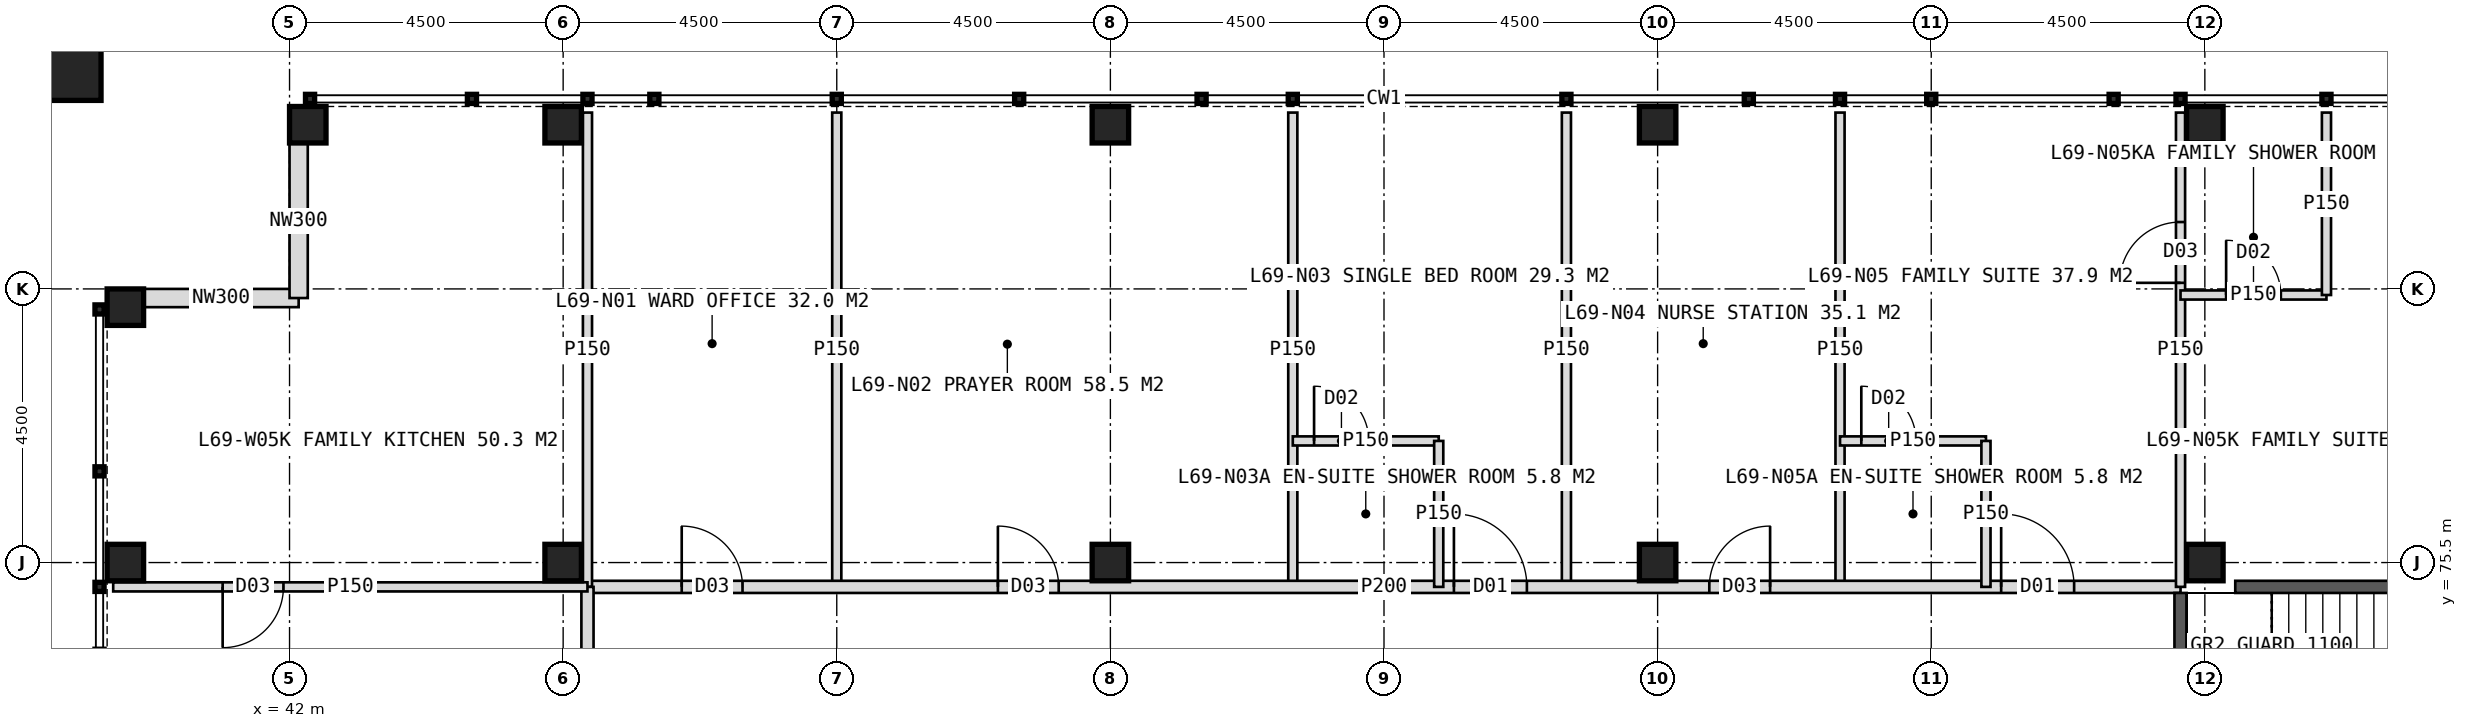
"""IFC4 building model, lengths in metres.
Left out: names, types, materials, properties, quantities, classifications, styles, units other than length and angle.
Written with IfcOpenShell. Run it as: python <this file> out.ifc"""

import sys

from ifc_helpers import new_model, si_unit, direction, frame, frame_2d, origin, origin_2d, place, context, subcontext, project, spatial, rectangle, hollow_rectangle, extrude, element, fill, save


model = new_model("IFC4")
c1 = context("Model", 3, precision=1e-05, world=origin(), true_north=direction((0.0, 1.0)))
c2 = subcontext(c1, "Body", "Model", "MODEL_VIEW")
j1 = project(units=[si_unit("LENGTHUNIT", "METRE"), si_unit("PLANEANGLEUNIT", "RADIAN")], contexts=[c1])
p1 = place(None, origin())
s1 = spatial("IfcSite", under=j1, at=p1, CompositionType="ELEMENT")
p2 = place(p1, origin())
s2 = spatial("IfcBuilding", under=s1, at=p2, CompositionType="ELEMENT")
p3 = place(p2, frame((0.0, 0.0, 286.0)))
s3 = spatial("IfcBuildingStorey", under=s2, at=p3, CompositionType="ELEMENT", Elevation=286.0)
for number, where, z_axis, x_axis in (
    (1, (73.5, 75.5, 0.0), (0.0, 0.0, 1.0), (1.0, 0.0, 0.0)),
    (2, (46.5, 75.5, 0.0), (0.0, 0.0, 1.0), (1.0, 0.0, 0.0)),
    (3, (55.5, 75.5, 0.0), (0.0, 0.0, 1.0), (1.0, 0.0, 0.0)),
    (4, (64.5, 75.5, 0.0), (0.0, 0.0, 1.0), (1.0, 0.0, 0.0)),
    (5, (42.3, 82.7, 0.0), (0.0, 0.0, 1.0), (1.0, 0.0, 0.0)),
    (6, (46.5, 82.7, 0.0), (0.0, 0.0, 1.0), (1.0, 0.0, 0.0)),
    (7, (55.5, 82.7, 0.0), (0.0, 0.0, 1.0), (1.0, 0.0, 0.0)),
    (8, (64.5, 82.7, 0.0), (0.0, 0.0, 1.0), (1.0, 0.0, 0.0)),
    (9, (73.5, 82.7, 0.0), (0.0, 0.0, 1.0), (1.0, 0.0, 0.0)),
    (10, (39.3, 75.5, 0.0), (0.0, 0.0, 1.0), (1.0, 0.0, 0.0)),
    (11, (39.3, 79.7, 0.0), (0.0, 0.0, 1.0), (1.0, 0.0, 0.0)),
):
    element("IfcColumn", number, at=place(p3, frame(where, z_axis=z_axis, x_axis=x_axis)), inside=s3, PredefinedType="COLUMN", context=c2, shape_type="SweptSolid", body=[
        extrude(hollow_rectangle(XDim=0.6, YDim=0.6, WallThickness=0.04, at=origin_2d()), origin(), (0.0, 0.0, 1.0), 4.0),
    ])
p4 = place(p3, frame((38.4, 83.6, 0.0), z_axis=(0.0, 0.0, 1.0), x_axis=(1.0, 0.0, 0.0)))
e12 = element("IfcColumn", 12, at=p4, inside=s3, PredefinedType="COLUMN", context=c2, shape_type="SweptSolid", body=[
    extrude(hollow_rectangle(XDim=1.0, YDim=1.0, WallThickness=0.06, at=origin_2d()), origin(), (0.0, 0.0, 1.0), 4.0),
])
for number, where, z_axis, x_axis in (
    (13, (39.6, 79.85, 0.0), (0.0, 0.0, 1.0), (1.0, 0.0, 0.0)),
    (14, (42.15, 79.85, 0.0), (0.0, 0.0, 1.0), (0.0, 1.0, 0.0)),
):
    element("IfcWall", number, at=place(p3, frame(where, z_axis=z_axis, x_axis=x_axis)), inside=s3, PredefinedType="ELEMENTEDWALL", context=c2, shape_type="SweptSolid", body=[
        extrude(rectangle(XDim=2.55, YDim=0.3, at=frame_2d((1.275, 0.0))), origin(), (0.0, 0.0, 1.0), 2.95),
    ])
for number, where, z_axis, x_axis in (
    (15, (51.0, 75.1, 0.0), (0.0, 0.0, 1.0), (0.0, 1.0, 0.0)),
    (16, (58.5, 75.1, 0.0), (0.0, 0.0, 1.0), (0.0, 1.0, 0.0)),
    (17, (63.0, 75.1, 0.0), (0.0, 0.0, 1.0), (0.0, 1.0, 0.0)),
    (18, (67.5, 75.1, 0.0), (0.0, 0.0, 1.0), (0.0, 1.0, 0.0)),
):
    element("IfcWall", number, at=place(p3, frame(where, z_axis=z_axis, x_axis=x_axis)), inside=s3, PredefinedType="PARTITIONING", context=c2, shape_type="SweptSolid", body=[
        extrude(rectangle(XDim=7.8, YDim=0.15, at=frame_2d((3.9, 0.0))), origin(), (0.0, 0.0, 1.0), 3.75),
    ])
p5 = place(p3, frame((46.9, 75.1, 0.0), z_axis=(0.0, 0.0, 1.0), x_axis=(1.0, 0.0, 0.0)))
e19 = element("IfcWall", 19, at=p5, inside=s3, PredefinedType="PARTITIONING", context=c2, shape_type="SweptSolid", body=[
    extrude(rectangle(XDim=26.2, YDim=0.2, at=frame_2d((13.1, 0.0))), origin(), (0.0, 0.0, 1.0), 3.75),
])
p6 = place(p5, frame((1.55, 0.0, 0.0)))
e20 = element("IfcOpeningElement", 20, at=p6, cuts=e19, PredefinedType="OPENING", context=c2, shape_type="SweptSolid", body=[
    extrude(rectangle(XDim=1.0, YDim=2.1, at=frame_2d((0.5, 1.05))), frame((0.0, 0.11, 0.0), z_axis=(0.0, -1.0, 0.0), x_axis=(1.0, 0.0, 0.0)), (0.0, 0.0, 1.0), 0.22),
])
p7 = place(p5, frame((6.75, 0.0, 0.0)))
e21 = element("IfcOpeningElement", 21, at=p7, cuts=e19, PredefinedType="OPENING", context=c2, shape_type="SweptSolid", body=[
    extrude(rectangle(XDim=1.0, YDim=2.1, at=frame_2d((0.5, 1.05))), frame((0.0, 0.11, 0.0), z_axis=(0.0, -1.0, 0.0), x_axis=(1.0, 0.0, 0.0)), (0.0, 0.0, 1.0), 0.22),
])
p8 = place(p5, frame((14.25, 0.0, 0.0)))
e22 = element("IfcOpeningElement", 22, at=p8, cuts=e19, PredefinedType="OPENING", context=c2, shape_type="SweptSolid", body=[
    extrude(rectangle(XDim=1.2, YDim=2.2, at=frame_2d((0.6, 1.1))), frame((0.0, 0.11, 0.0), z_axis=(0.0, -1.0, 0.0), x_axis=(1.0, 0.0, 0.0)), (0.0, 0.0, 1.0), 0.22),
])
p9 = place(p5, frame((18.45, 0.0, 0.0)))
e23 = element("IfcOpeningElement", 23, at=p9, cuts=e19, PredefinedType="OPENING", context=c2, shape_type="SweptSolid", body=[
    extrude(rectangle(XDim=1.0, YDim=2.1, at=frame_2d((0.5, 1.05))), frame((0.0, 0.11, 0.0), z_axis=(0.0, -1.0, 0.0), x_axis=(1.0, 0.0, 0.0)), (0.0, 0.0, 1.0), 0.22),
])
p10 = place(p5, frame((23.25, 0.0, 0.0)))
e24 = element("IfcOpeningElement", 24, at=p10, cuts=e19, PredefinedType="OPENING", context=c2, shape_type="SweptSolid", body=[
    extrude(rectangle(XDim=1.2, YDim=2.2, at=frame_2d((0.6, 1.1))), frame((0.0, 0.11, 0.0), z_axis=(0.0, -1.0, 0.0), x_axis=(1.0, 0.0, 0.0)), (0.0, 0.0, 1.0), 0.22),
])
p11 = place(p3, frame((46.9, 75.1, 0.0), z_axis=(0.0, 0.0, 1.0), x_axis=(0.0, 1.0, 0.0)))
e25 = element("IfcWall", 25, at=p11, inside=s3, PredefinedType="PARTITIONING", context=c2, shape_type="SweptSolid", body=[
    extrude(rectangle(XDim=7.8, YDim=0.15, at=frame_2d((3.9, 0.0))), origin(), (0.0, 0.0, 1.0), 3.75),
])
p12 = place(p3, frame((58.5, 77.5, 0.0), z_axis=(0.0, 0.0, 1.0), x_axis=(1.0, 0.0, 0.0)))
e26 = element("IfcWall", 26, at=p12, inside=s3, PredefinedType="PARTITIONING", context=c2, shape_type="SweptSolid", body=[
    extrude(rectangle(XDim=2.4, YDim=0.15, at=frame_2d((1.2, 0.0))), origin(), (0.0, 0.0, 1.0), 3.75),
])
p13 = place(p12, frame((0.35, 0.0, 0.0)))
e27 = element("IfcOpeningElement", 27, at=p13, cuts=e26, PredefinedType="OPENING", context=c2, shape_type="SweptSolid", body=[
    extrude(rectangle(XDim=0.9, YDim=2.1, at=frame_2d((0.45, 1.05))), frame((0.0, 0.085, 0.0), z_axis=(0.0, -1.0, 0.0), x_axis=(1.0, 0.0, 0.0)), (0.0, 0.0, 1.0), 0.17),
])
p14 = place(p3, frame((60.9, 75.1, 0.0), z_axis=(0.0, 0.0, 1.0), x_axis=(0.0, 1.0, 0.0)))
e28 = element("IfcWall", 28, at=p14, inside=s3, PredefinedType="PARTITIONING", context=c2, shape_type="SweptSolid", body=[
    extrude(rectangle(XDim=2.4, YDim=0.15, at=frame_2d((1.2, 0.0))), origin(), (0.0, 0.0, 1.0), 3.75),
])
p15 = place(p3, frame((73.1, 75.1, 0.0), z_axis=(0.0, 0.0, 1.0), x_axis=(0.0, 1.0, 0.0)))
e29 = element("IfcWall", 29, at=p15, inside=s3, PredefinedType="PARTITIONING", context=c2, shape_type="SweptSolid", body=[
    extrude(rectangle(XDim=7.8, YDim=0.15, at=frame_2d((3.9, 0.0))), origin(), (0.0, 0.0, 1.0), 3.75),
])
p16 = place(p15, frame((5.0, 0.0, 0.0)))
e30 = element("IfcOpeningElement", 30, at=p16, cuts=e29, PredefinedType="OPENING", context=c2, shape_type="SweptSolid", body=[
    extrude(rectangle(XDim=1.0, YDim=2.1, at=frame_2d((0.5, 1.05))), frame((0.0, 0.085, 0.0), z_axis=(0.0, -1.0, 0.0), x_axis=(1.0, 0.0, 0.0)), (0.0, 0.0, 1.0), 0.17),
])
p17 = place(p3, frame((73.1, 79.9, 0.0), z_axis=(0.0, 0.0, 1.0), x_axis=(1.0, 0.0, 0.0)))
e31 = element("IfcWall", 31, at=p17, inside=s3, PredefinedType="PARTITIONING", context=c2, shape_type="SweptSolid", body=[
    extrude(rectangle(XDim=2.4, YDim=0.15, at=frame_2d((1.2, 0.0))), origin(), (0.0, 0.0, 1.0), 3.75),
])
p18 = place(p17, frame((0.75, 0.0, 0.0)))
e32 = element("IfcOpeningElement", 32, at=p18, cuts=e31, PredefinedType="OPENING", context=c2, shape_type="SweptSolid", body=[
    extrude(rectangle(XDim=0.9, YDim=2.1, at=frame_2d((0.45, 1.05))), frame((0.0, 0.085, 0.0), z_axis=(0.0, -1.0, 0.0), x_axis=(1.0, 0.0, 0.0)), (0.0, 0.0, 1.0), 0.17),
])
p19 = place(p3, frame((75.5, 79.9, 0.0), z_axis=(0.0, 0.0, 1.0), x_axis=(0.0, 1.0, 0.0)))
e33 = element("IfcWall", 33, at=p19, inside=s3, PredefinedType="PARTITIONING", context=c2, shape_type="SweptSolid", body=[
    extrude(rectangle(XDim=3.0, YDim=0.15, at=frame_2d((1.5, 0.0))), origin(), (0.0, 0.0, 1.0), 3.75),
])
p20 = place(p3, frame((67.5, 77.5, 0.0), z_axis=(0.0, 0.0, 1.0), x_axis=(1.0, 0.0, 0.0)))
e34 = element("IfcWall", 34, at=p20, inside=s3, PredefinedType="PARTITIONING", context=c2, shape_type="SweptSolid", body=[
    extrude(rectangle(XDim=2.4, YDim=0.15, at=frame_2d((1.2, 0.0))), origin(), (0.0, 0.0, 1.0), 3.75),
])
p21 = place(p20, frame((0.35, 0.0, 0.0)))
e35 = element("IfcOpeningElement", 35, at=p21, cuts=e34, PredefinedType="OPENING", context=c2, shape_type="SweptSolid", body=[
    extrude(rectangle(XDim=0.9, YDim=2.1, at=frame_2d((0.45, 1.05))), frame((0.0, 0.085, 0.0), z_axis=(0.0, -1.0, 0.0), x_axis=(1.0, 0.0, 0.0)), (0.0, 0.0, 1.0), 0.17),
])
p22 = place(p3, frame((69.9, 75.1, 0.0), z_axis=(0.0, 0.0, 1.0), x_axis=(0.0, 1.0, 0.0)))
e36 = element("IfcWall", 36, at=p22, inside=s3, PredefinedType="PARTITIONING", context=c2, shape_type="SweptSolid", body=[
    extrude(rectangle(XDim=2.4, YDim=0.15, at=frame_2d((1.2, 0.0))), origin(), (0.0, 0.0, 1.0), 3.75),
])
p23 = place(p3, frame((46.9, 48.9, 0.0), z_axis=(0.0, 0.0, 1.0), x_axis=(0.0, 1.0, 0.0)))
e37 = element("IfcWall", 37, at=p23, inside=s3, PredefinedType="PARTITIONING", context=c2, shape_type="SweptSolid", body=[
    extrude(rectangle(XDim=26.2, YDim=0.2, at=frame_2d((13.1, 0.0))), origin(), (0.0, 0.0, 1.0), 3.75),
])
p24 = place(p23, frame((1.55, 0.0, 0.0)))
e38 = element("IfcOpeningElement", 38, at=p24, cuts=e37, PredefinedType="OPENING", context=c2, shape_type="SweptSolid", body=[
    extrude(rectangle(XDim=1.0, YDim=2.1, at=frame_2d((0.5, 1.05))), frame((0.0, 0.11, 0.0), z_axis=(0.0, -1.0, 0.0), x_axis=(1.0, 0.0, 0.0)), (0.0, 0.0, 1.0), 0.22),
])
p25 = place(p23, frame((6.6, 0.0, 0.0)))
e39 = element("IfcOpeningElement", 39, at=p25, cuts=e37, PredefinedType="OPENING", context=c2, shape_type="SweptSolid", body=[
    extrude(rectangle(XDim=1.0, YDim=2.1, at=frame_2d((0.5, 1.05))), frame((0.0, 0.11, 0.0), z_axis=(0.0, -1.0, 0.0), x_axis=(1.0, 0.0, 0.0)), (0.0, 0.0, 1.0), 0.22),
])
p26 = place(p23, frame((11.1, 0.0, 0.0)))
e40 = element("IfcOpeningElement", 40, at=p26, cuts=e37, PredefinedType="OPENING", context=c2, shape_type="SweptSolid", body=[
    extrude(rectangle(XDim=1.0, YDim=2.1, at=frame_2d((0.5, 1.05))), frame((0.0, 0.11, 0.0), z_axis=(0.0, -1.0, 0.0), x_axis=(1.0, 0.0, 0.0)), (0.0, 0.0, 1.0), 0.22),
])
p27 = place(p23, frame((18.45, 0.0, 0.0)))
e41 = element("IfcOpeningElement", 41, at=p27, cuts=e37, PredefinedType="OPENING", context=c2, shape_type="SweptSolid", body=[
    extrude(rectangle(XDim=1.2, YDim=2.2, at=frame_2d((0.6, 1.1))), frame((0.0, 0.11, 0.0), z_axis=(0.0, -1.0, 0.0), x_axis=(1.0, 0.0, 0.0)), (0.0, 0.0, 1.0), 0.22),
])
p28 = place(p23, frame((22.9, 0.0, 0.0)))
e42 = element("IfcOpeningElement", 42, at=p28, cuts=e37, PredefinedType="OPENING", context=c2, shape_type="SweptSolid", body=[
    extrude(rectangle(XDim=1.0, YDim=2.1, at=frame_2d((0.5, 1.05))), frame((0.0, 0.11, 0.0), z_axis=(0.0, -1.0, 0.0), x_axis=(1.0, 0.0, 0.0)), (0.0, 0.0, 1.0), 0.22),
])
p29 = place(p3, frame((46.9, 75.1, 0.0), z_axis=(0.0, 0.0, 1.0), x_axis=(-1.0, 0.0, 0.0)))
e43 = element("IfcWall", 43, at=p29, inside=s3, PredefinedType="PARTITIONING", context=c2, shape_type="SweptSolid", body=[
    extrude(rectangle(XDim=7.8, YDim=0.15, at=frame_2d((3.9, 0.0))), origin(), (0.0, 0.0, 1.0), 3.75),
])
p30 = place(p29, frame((5.0, 0.0, 0.0)))
e44 = element("IfcOpeningElement", 44, at=p30, cuts=e43, PredefinedType="OPENING", context=c2, shape_type="SweptSolid", body=[
    extrude(rectangle(XDim=1.0, YDim=2.1, at=frame_2d((0.5, 1.05))), frame((0.0, 0.085, 0.0), z_axis=(0.0, -1.0, 0.0), x_axis=(1.0, 0.0, 0.0)), (0.0, 0.0, 1.0), 0.17),
])
p31 = place(p3, frame((73.1, 75.0, 0.0), z_axis=(0.0, 0.0, 1.0), x_axis=(0.0, -1.0, 0.0)))
e45 = element("IfcWall", 45, at=p31, inside=s3, PredefinedType="SOLIDWALL", context=c2, shape_type="SweptSolid", body=[
    extrude(rectangle(XDim=4.0, YDim=0.2, at=frame_2d((2.0, 0.0))), origin(), (0.0, 0.0, 1.0), 3.75),
])
p32 = place(p31, frame((1.5, 0.0, 0.0)))
e46 = element("IfcOpeningElement", 46, at=p32, cuts=e45, PredefinedType="OPENING", context=c2, shape_type="SweptSolid", body=[
    extrude(rectangle(XDim=1.2, YDim=2.1, at=frame_2d((0.6, 1.05))), frame((0.0, 0.11, 0.0), z_axis=(0.0, -1.0, 0.0), x_axis=(1.0, 0.0, 0.0)), (0.0, 0.0, 1.0), 0.22),
])
p33 = place(p3, frame((74.0, 75.1, 0.0), z_axis=(0.0, 0.0, 1.0), x_axis=(1.0, 0.0, 0.0)))
e47 = element("IfcWall", 47, at=p33, inside=s3, PredefinedType="SOLIDWALL", context=c2, shape_type="SweptSolid", body=[
    extrude(rectangle(XDim=6.15, YDim=0.2, at=frame_2d((3.075, 0.0))), origin(), (0.0, 0.0, 1.0), 3.75),
])
p34 = place(p6, origin())
e48 = element("IfcDoor", 48, at=p34, inside=s3, OperationType="SINGLE_SWING_LEFT", PredefinedType="DOOR", context=c2, shape_type="SweptSolid", body=[
    extrude(rectangle(XDim=1.0, YDim=2.1, at=frame_2d((0.5, 1.05))), frame((0.0, 0.025, 0.0), z_axis=(0.0, -1.0, 0.0), x_axis=(1.0, 0.0, 0.0)), (0.0, 0.0, 1.0), 0.05),
])
fill(e20, e48)
p35 = place(p7, origin())
e49 = element("IfcDoor", 49, at=p35, inside=s3, OperationType="SINGLE_SWING_LEFT", PredefinedType="DOOR", context=c2, shape_type="SweptSolid", body=[
    extrude(rectangle(XDim=1.0, YDim=2.1, at=frame_2d((0.5, 1.05))), frame((0.0, 0.025, 0.0), z_axis=(0.0, -1.0, 0.0), x_axis=(1.0, 0.0, 0.0)), (0.0, 0.0, 1.0), 0.05),
])
fill(e21, e49)
p36 = place(p8, origin())
e50 = element("IfcDoor", 50, at=p36, inside=s3, OperationType="SINGLE_SWING_LEFT", PredefinedType="DOOR", context=c2, shape_type="SweptSolid", body=[
    extrude(rectangle(XDim=1.2, YDim=2.2, at=frame_2d((0.6, 1.1))), frame((0.0, 0.025, 0.0), z_axis=(0.0, -1.0, 0.0), x_axis=(1.0, 0.0, 0.0)), (0.0, 0.0, 1.0), 0.05),
])
fill(e22, e50)
p37 = place(p13, origin())
e51 = element("IfcDoor", 51, at=p37, inside=s3, OperationType="SINGLE_SWING_LEFT", PredefinedType="DOOR", context=c2, shape_type="SweptSolid", body=[
    extrude(rectangle(XDim=0.9, YDim=2.1, at=frame_2d((0.45, 1.05))), frame((0.0, 0.025, 0.0), z_axis=(0.0, -1.0, 0.0), x_axis=(1.0, 0.0, 0.0)), (0.0, 0.0, 1.0), 0.05),
])
fill(e27, e51)
p38 = place(p9, origin())
e52 = element("IfcDoor", 52, at=p38, inside=s3, OperationType="SINGLE_SWING_RIGHT", PredefinedType="DOOR", context=c2, shape_type="SweptSolid", body=[
    extrude(rectangle(XDim=1.0, YDim=2.1, at=frame_2d((0.5, 1.05))), frame((0.0, 0.025, 0.0), z_axis=(0.0, -1.0, 0.0), x_axis=(1.0, 0.0, 0.0)), (0.0, 0.0, 1.0), 0.05),
])
fill(e23, e52)
p39 = place(p18, origin())
e53 = element("IfcDoor", 53, at=p39, inside=s3, OperationType="SINGLE_SWING_LEFT", PredefinedType="DOOR", context=c2, shape_type="SweptSolid", body=[
    extrude(rectangle(XDim=0.9, YDim=2.1, at=frame_2d((0.45, 1.05))), frame((0.0, 0.025, 0.0), z_axis=(0.0, -1.0, 0.0), x_axis=(1.0, 0.0, 0.0)), (0.0, 0.0, 1.0), 0.05),
])
fill(e32, e53)
p40 = place(p16, origin())
e54 = element("IfcDoor", 54, at=p40, inside=s3, OperationType="SINGLE_SWING_LEFT", PredefinedType="DOOR", context=c2, shape_type="SweptSolid", body=[
    extrude(rectangle(XDim=1.0, YDim=2.1, at=frame_2d((0.5, 1.05))), frame((0.0, 0.025, 0.0), z_axis=(0.0, -1.0, 0.0), x_axis=(1.0, 0.0, 0.0)), (0.0, 0.0, 1.0), 0.05),
])
fill(e30, e54)
p41 = place(p10, origin())
e55 = element("IfcDoor", 55, at=p41, inside=s3, OperationType="SINGLE_SWING_LEFT", PredefinedType="DOOR", context=c2, shape_type="SweptSolid", body=[
    extrude(rectangle(XDim=1.2, YDim=2.2, at=frame_2d((0.6, 1.1))), frame((0.0, 0.025, 0.0), z_axis=(0.0, -1.0, 0.0), x_axis=(1.0, 0.0, 0.0)), (0.0, 0.0, 1.0), 0.05),
])
fill(e24, e55)
p42 = place(p21, origin())
e56 = element("IfcDoor", 56, at=p42, inside=s3, OperationType="SINGLE_SWING_LEFT", PredefinedType="DOOR", context=c2, shape_type="SweptSolid", body=[
    extrude(rectangle(XDim=0.9, YDim=2.1, at=frame_2d((0.45, 1.05))), frame((0.0, 0.025, 0.0), z_axis=(0.0, -1.0, 0.0), x_axis=(1.0, 0.0, 0.0)), (0.0, 0.0, 1.0), 0.05),
])
fill(e35, e56)
p43 = place(p30, origin())
e57 = element("IfcDoor", 57, at=p43, inside=s3, OperationType="SINGLE_SWING_RIGHT", PredefinedType="DOOR", context=c2, shape_type="SweptSolid", body=[
    extrude(rectangle(XDim=1.0, YDim=2.1, at=frame_2d((0.5, 1.05))), frame((0.0, 0.025, 0.0), z_axis=(0.0, -1.0, 0.0), x_axis=(1.0, 0.0, 0.0)), (0.0, 0.0, 1.0), 0.05),
])
fill(e44, e57)
save(model, sys.argv[1])
